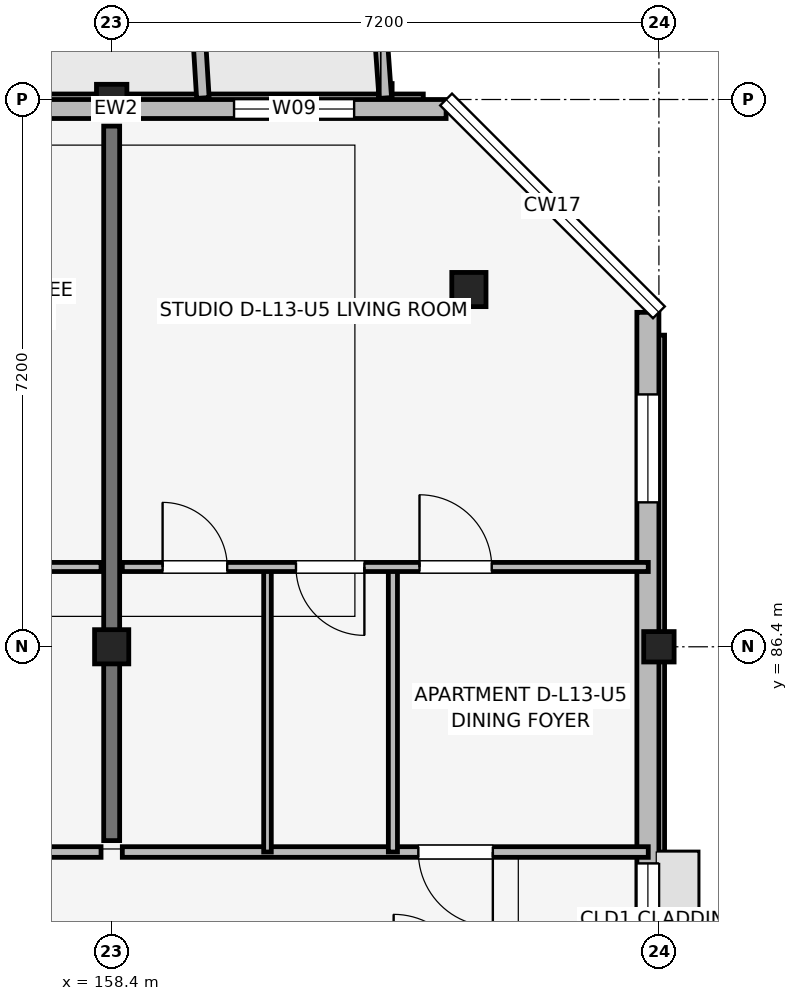
"""IFC4 building model, lengths in metres.
Left out: names, types, materials, properties, quantities, classifications, styles, units other than length and angle.
Written with IfcOpenShell. Run it as: python <this file> out.ifc"""

import sys

from ifc_helpers import new_model, si_unit, direction, frame, frame_2d, origin, origin_2d, place, context, subcontext, project, spatial, rectangle, extrude, element, fill, save


model = new_model("IFC4")
c1 = context("Model", 3, precision=1e-05, world=origin(), true_north=direction((0.0, 1.0)))
c2 = subcontext(c1, "Body", "Model", "MODEL_VIEW")
j1 = project(units=[si_unit("LENGTHUNIT", "METRE"), si_unit("PLANEANGLEUNIT", "RADIAN")], contexts=[c1])
p1 = place(None, origin())
s1 = spatial("IfcSite", under=j1, at=p1, CompositionType="ELEMENT")
p2 = place(p1, origin())
s2 = spatial("IfcBuilding", under=s1, at=p2, CompositionType="ELEMENT")
p3 = place(p2, frame((0.0, 0.0, 43.35)))
s3 = spatial("IfcBuildingStorey", under=s2, at=p3, CompositionType="ELEMENT", Elevation=43.35)
p4 = place(p3, frame((158.4, 86.4, 0.0), z_axis=(0.0, 0.0, 1.0), x_axis=(1.0, 0.0, 0.0)))
e1 = element("IfcColumn", 1, at=p4, inside=s3, PredefinedType="COLUMN", context=c2, shape_type="SweptSolid", body=[
    extrude(rectangle(XDim=0.45, YDim=0.45, at=origin_2d()), origin(), (0.0, 0.0, 1.0), 3.15),
])
for number, where, z_axis, x_axis in (
    (2, (158.4, 93.6, 0.0), (0.0, 0.0, 1.0), (1.0, 0.0, 0.0)),
    (3, (165.6, 86.4, 0.0), (0.0, 0.0, 1.0), (1.0, 0.0, 0.0)),
):
    element("IfcColumn", number, at=place(p3, frame(where, z_axis=z_axis, x_axis=x_axis)), inside=s3, PredefinedType="COLUMN", context=c2, shape_type="SweptSolid", body=[
        extrude(rectangle(XDim=0.4, YDim=0.4, at=origin_2d()), origin(), (0.0, 0.0, 1.0), 3.15),
    ])
p5 = place(p3, frame((163.1, 91.1, 0.0), z_axis=(0.0, 0.0, 1.0), x_axis=(1.0, 0.0, 0.0)))
e4 = element("IfcColumn", 4, at=p5, inside=s3, PredefinedType="COLUMN", context=c2, shape_type="SweptSolid", body=[
    extrude(rectangle(XDim=0.45, YDim=0.45, at=origin_2d()), origin(), (0.0, 0.0, 1.0), 3.15),
])
p6 = place(p3, frame((158.4, 83.85, 0.0), z_axis=(0.0, 0.0, 1.0), x_axis=(0.0, 1.0, 0.0)))
e5 = element("IfcWall", 5, at=p6, inside=s3, PredefinedType="SHEAR", context=c2, shape_type="SweptSolid", body=[
    extrude(rectangle(XDim=9.4, YDim=0.21, at=frame_2d((4.7, 0.0))), origin(), (0.0, 0.0, 1.0), 3.15),
])
p7 = place(p3, frame((165.455, 74.8, 0.0), z_axis=(0.0, 0.0, 1.0), x_axis=(0.0, 1.0, 0.0)))
e6 = element("IfcWall", 6, at=p7, inside=s3, PredefinedType="SOLIDWALL", context=c2, shape_type="SweptSolid", body=[
    extrude(rectangle(XDim=16.0, YDim=0.29, at=frame_2d((8.0, 0.0))), origin(), (0.0, 0.0, 1.0), 2.51),
])
p8 = place(p7, frame((7.25, 0.0, 1.05)))
e7 = element("IfcOpeningElement", 7, at=p8, cuts=e6, PredefinedType="OPENING", context=c2, shape_type="SweptSolid", body=[
    extrude(rectangle(XDim=1.5, YDim=1.15, at=frame_2d((0.75, 0.575))), frame((0.0, 0.155, 0.0), z_axis=(0.0, -1.0, 0.0), x_axis=(1.0, 0.0, 0.0)), (0.0, 0.0, 1.0), 0.31),
])
p9 = place(p7, frame((13.5, 0.0, 0.75)))
e8 = element("IfcOpeningElement", 8, at=p9, cuts=e6, PredefinedType="OPENING", context=c2, shape_type="SweptSolid", body=[
    extrude(rectangle(XDim=1.42, YDim=1.6, at=frame_2d((0.71, 0.8))), frame((0.0, 0.155, 0.0), z_axis=(0.0, -1.0, 0.0), x_axis=(1.0, 0.0, 0.0)), (0.0, 0.0, 1.0), 0.31),
])
p10 = place(p3, frame((162.8, 93.475, 0.0), z_axis=(0.0, 0.0, 1.0), x_axis=(-1.0, 0.0, 0.0)))
e9 = element("IfcWall", 9, at=p10, inside=s3, PredefinedType="SOLIDWALL", context=c2, shape_type="SweptSolid", body=[
    extrude(rectangle(XDim=30.4, YDim=0.25, at=frame_2d((15.2, 0.0))), origin(), (0.0, 0.0, 1.0), 2.45),
])
p11 = place(p10, frame((21.95, 0.0, 0.0), z_axis=(0.0, 0.0, 1.0), x_axis=(-1.0, 0.0, 0.0)))
e10 = element("IfcOpeningElement", 10, at=p11, cuts=e9, PredefinedType="OPENING", context=c2, shape_type="SweptSolid", body=[
    extrude(rectangle(XDim=1.5, YDim=2.15, at=frame_2d((0.75, 1.075))), frame((0.0, 0.135, 0.0), z_axis=(0.0, -1.0, 0.0), x_axis=(1.0, 0.0, 0.0)), (0.0, 0.0, 1.0), 0.27),
])
p12 = place(p10, frame((7.7, 0.0, 0.0), z_axis=(0.0, 0.0, 1.0), x_axis=(-1.0, 0.0, 0.0)))
e11 = element("IfcOpeningElement", 11, at=p12, cuts=e9, PredefinedType="OPENING", context=c2, shape_type="SweptSolid", body=[
    extrude(rectangle(XDim=1.8, YDim=2.15, at=frame_2d((0.9, 1.075))), frame((0.0, 0.135, 0.0), z_axis=(0.0, -1.0, 0.0), x_axis=(1.0, 0.0, 0.0)), (0.0, 0.0, 1.0), 0.27),
])
p13 = place(p10, frame((27.97, 0.0, 0.7)))
e12 = element("IfcOpeningElement", 12, at=p13, cuts=e9, PredefinedType="OPENING", context=c2, shape_type="SweptSolid", body=[
    extrude(rectangle(XDim=1.46, YDim=1.55, at=frame_2d((0.73, 0.775))), frame((0.0, 0.135, 0.0), z_axis=(0.0, -1.0, 0.0), x_axis=(1.0, 0.0, 0.0)), (0.0, 0.0, 1.0), 0.27),
])
p14 = place(p10, frame((26.42, 0.0, 0.75)))
e13 = element("IfcOpeningElement", 13, at=p14, cuts=e9, PredefinedType="OPENING", context=c2, shape_type="SweptSolid", body=[
    extrude(rectangle(XDim=0.6, YDim=1.25, at=frame_2d((0.3, 0.625))), frame((0.0, 0.135, 0.0), z_axis=(0.0, -1.0, 0.0), x_axis=(1.0, 0.0, 0.0)), (0.0, 0.0, 1.0), 0.27),
])
p15 = place(p10, frame((24.98, 0.0, 0.75)))
e14 = element("IfcOpeningElement", 14, at=p15, cuts=e9, PredefinedType="OPENING", context=c2, shape_type="SweptSolid", body=[
    extrude(rectangle(XDim=0.6, YDim=1.25, at=frame_2d((0.3, 0.625))), frame((0.0, 0.135, 0.0), z_axis=(0.0, -1.0, 0.0), x_axis=(1.0, 0.0, 0.0)), (0.0, 0.0, 1.0), 0.27),
])
p16 = place(p10, frame((16.725, 0.0, 0.75)))
e15 = element("IfcOpeningElement", 15, at=p16, cuts=e9, PredefinedType="OPENING", context=c2, shape_type="SweptSolid", body=[
    extrude(rectangle(XDim=0.72, YDim=1.35, at=frame_2d((0.36, 0.675))), frame((0.0, 0.135, 0.0), z_axis=(0.0, -1.0, 0.0), x_axis=(1.0, 0.0, 0.0)), (0.0, 0.0, 1.0), 0.27),
])
p17 = place(p10, frame((12.925, 0.0, 0.69)))
e16 = element("IfcOpeningElement", 16, at=p17, cuts=e9, PredefinedType="OPENING", context=c2, shape_type="SweptSolid", body=[
    extrude(rectangle(XDim=2.15, YDim=1.65, at=frame_2d((1.075, 0.825))), frame((0.0, 0.135, 0.0), z_axis=(0.0, -1.0, 0.0), x_axis=(1.0, 0.0, 0.0)), (0.0, 0.0, 1.0), 0.27),
])
p18 = place(p10, frame((9.525, 0.0, 0.75)))
e17 = element("IfcOpeningElement", 17, at=p18, cuts=e9, PredefinedType="OPENING", context=c2, shape_type="SweptSolid", body=[
    extrude(rectangle(XDim=0.72, YDim=1.35, at=frame_2d((0.36, 0.675))), frame((0.0, 0.135, 0.0), z_axis=(0.0, -1.0, 0.0), x_axis=(1.0, 0.0, 0.0)), (0.0, 0.0, 1.0), 0.27),
])
p19 = place(p10, frame((1.21, 0.0, 0.7)))
e18 = element("IfcOpeningElement", 18, at=p19, cuts=e9, PredefinedType="OPENING", context=c2, shape_type="SweptSolid", body=[
    extrude(rectangle(XDim=1.58, YDim=1.6, at=frame_2d((0.79, 0.8))), frame((0.0, 0.135, 0.0), z_axis=(0.0, -1.0, 0.0), x_axis=(1.0, 0.0, 0.0)), (0.0, 0.0, 1.0), 0.27),
])
p20 = place(p3, frame((159.6, 93.62, 0.0), z_axis=(0.0, 0.0, 1.0), x_axis=(-0.061170732449, 0.998127317276, 0.0)))
e19 = element("IfcWall", 19, at=p20, inside=s3, PredefinedType="ELEMENTEDWALL", context=c2, shape_type="SweptSolid", body=[
    extrude(rectangle(XDim=1.964, YDim=0.165, at=frame_2d((0.982, 0.0))), origin(), (0.0, 0.0, 1.0), 2.8),
])
p21 = place(p3, frame((162.0, 93.62, 0.0), z_axis=(0.0, 0.0, 1.0), x_axis=(-0.071194071069, 0.997462482625, 0.0)))
e20 = element("IfcWall", 20, at=p21, inside=s3, PredefinedType="ELEMENTEDWALL", context=c2, shape_type="SweptSolid", body=[
    extrude(rectangle(XDim=1.965, YDim=0.165, at=frame_2d((0.982, 0.0))), origin(), (0.0, 0.0, 1.0), 2.8),
])
p22 = place(p3, frame((151.34, 83.7, 0.0), z_axis=(0.0, 0.0, 1.0), x_axis=(1.0, 0.0, 0.0)))
e21 = element("IfcWall", 21, at=p22, inside=s3, PredefinedType="PARTITIONING", context=c2, shape_type="SweptSolid", body=[
    extrude(rectangle(XDim=6.92, YDim=0.14, at=frame_2d((3.46, 0.0))), origin(), (0.0, 0.0, 1.0), 2.38),
])
p23 = place(p22, frame((5.145, 0.0, 0.0)))
e22 = element("IfcOpeningElement", 22, at=p23, cuts=e21, PredefinedType="OPENING", context=c2, shape_type="SweptSolid", body=[
    extrude(rectangle(XDim=0.98, YDim=2.1, at=frame_2d((0.49, 1.05))), frame((0.0, 0.08, 0.0), z_axis=(0.0, -1.0, 0.0), x_axis=(1.0, 0.0, 0.0)), (0.0, 0.0, 1.0), 0.16),
])
p24 = place(p3, frame((151.34, 87.45, 0.0), z_axis=(0.0, 0.0, 1.0), x_axis=(1.0, 0.0, 0.0)))
e23 = element("IfcWall", 23, at=p24, inside=s3, PredefinedType="PARTITIONING", context=c2, shape_type="SweptSolid", body=[
    extrude(rectangle(XDim=6.92, YDim=0.12, at=frame_2d((3.46, 0.0))), origin(), (0.0, 0.0, 1.0), 2.38),
])
p25 = place(p24, frame((1.475, 0.0, 0.0), z_axis=(0.0, 0.0, 1.0), x_axis=(-1.0, 0.0, 0.0)))
e24 = element("IfcOpeningElement", 24, at=p25, cuts=e23, PredefinedType="OPENING", context=c2, shape_type="SweptSolid", body=[
    extrude(rectangle(XDim=0.85, YDim=2.08, at=frame_2d((0.425, 1.04))), frame((0.0, 0.07, 0.0), z_axis=(0.0, -1.0, 0.0), x_axis=(1.0, 0.0, 0.0)), (0.0, 0.0, 1.0), 0.14),
])
p26 = place(p24, frame((2.775, 0.0, 0.0)))
e25 = element("IfcOpeningElement", 25, at=p26, cuts=e23, PredefinedType="OPENING", context=c2, shape_type="SweptSolid", body=[
    extrude(rectangle(XDim=0.9, YDim=2.08, at=frame_2d((0.45, 1.04))), frame((0.0, 0.07, 0.0), z_axis=(0.0, -1.0, 0.0), x_axis=(1.0, 0.0, 0.0)), (0.0, 0.0, 1.0), 0.14),
])
p27 = place(p24, frame((6.11, 0.0, 0.0), z_axis=(0.0, 0.0, 1.0), x_axis=(-1.0, 0.0, 0.0)))
e26 = element("IfcOpeningElement", 26, at=p27, cuts=e23, PredefinedType="OPENING", context=c2, shape_type="SweptSolid", body=[
    extrude(rectangle(XDim=0.95, YDim=2.08, at=frame_2d((0.475, 1.04))), frame((0.0, 0.07, 0.0), z_axis=(0.0, -1.0, 0.0), x_axis=(1.0, 0.0, 0.0)), (0.0, 0.0, 1.0), 0.14),
])
p28 = place(p3, frame((158.54, 83.7, 0.0), z_axis=(0.0, 0.0, 1.0), x_axis=(1.0, 0.0, 0.0)))
e27 = element("IfcWall", 27, at=p28, inside=s3, PredefinedType="PARTITIONING", context=c2, shape_type="SweptSolid", body=[
    extrude(rectangle(XDim=6.92, YDim=0.14, at=frame_2d((3.46, 0.0))), origin(), (0.0, 0.0, 1.0), 2.38),
])
p29 = place(p28, frame((4.875, 0.0, 0.0), z_axis=(0.0, 0.0, 1.0), x_axis=(-1.0, 0.0, 0.0)))
e28 = element("IfcOpeningElement", 28, at=p29, cuts=e27, PredefinedType="OPENING", context=c2, shape_type="SweptSolid", body=[
    extrude(rectangle(XDim=0.98, YDim=2.1, at=frame_2d((0.49, 1.05))), frame((0.0, 0.08, 0.0), z_axis=(0.0, -1.0, 0.0), x_axis=(1.0, 0.0, 0.0)), (0.0, 0.0, 1.0), 0.16),
])
p30 = place(p3, frame((160.45, 83.7, 0.0), z_axis=(0.0, 0.0, 1.0), x_axis=(0.0, 1.0, 0.0)))
e29 = element("IfcWall", 29, at=p30, inside=s3, PredefinedType="PARTITIONING", context=c2, shape_type="SweptSolid", body=[
    extrude(rectangle(XDim=3.75, YDim=0.1, at=frame_2d((1.875, 0.0))), origin(), (0.0, 0.0, 1.0), 2.38),
])
p31 = place(p3, frame((162.1, 83.7, 0.0), z_axis=(0.0, 0.0, 1.0), x_axis=(0.0, 1.0, 0.0)))
e30 = element("IfcWall", 30, at=p31, inside=s3, PredefinedType="PARTITIONING", context=c2, shape_type="SweptSolid", body=[
    extrude(rectangle(XDim=3.75, YDim=0.12, at=frame_2d((1.875, 0.0))), origin(), (0.0, 0.0, 1.0), 2.38),
])
p32 = place(p3, frame((158.54, 87.45, 0.0), z_axis=(0.0, 0.0, 1.0), x_axis=(1.0, 0.0, 0.0)))
e31 = element("IfcWall", 31, at=p32, inside=s3, PredefinedType="PARTITIONING", context=c2, shape_type="SweptSolid", body=[
    extrude(rectangle(XDim=6.92, YDim=0.12, at=frame_2d((3.46, 0.0))), origin(), (0.0, 0.0, 1.0), 2.38),
])
p33 = place(p32, frame((0.53, 0.0, 0.0)))
e32 = element("IfcOpeningElement", 32, at=p33, cuts=e31, PredefinedType="OPENING", context=c2, shape_type="SweptSolid", body=[
    extrude(rectangle(XDim=0.85, YDim=2.08, at=frame_2d((0.425, 1.04))), frame((0.0, 0.07, 0.0), z_axis=(0.0, -1.0, 0.0), x_axis=(1.0, 0.0, 0.0)), (0.0, 0.0, 1.0), 0.14),
])
p34 = place(p32, frame((3.185, 0.0, 0.0), z_axis=(0.0, 0.0, 1.0), x_axis=(-1.0, 0.0, 0.0)))
e33 = element("IfcOpeningElement", 33, at=p34, cuts=e31, PredefinedType="OPENING", context=c2, shape_type="SweptSolid", body=[
    extrude(rectangle(XDim=0.9, YDim=2.08, at=frame_2d((0.45, 1.04))), frame((0.0, 0.07, 0.0), z_axis=(0.0, -1.0, 0.0), x_axis=(1.0, 0.0, 0.0)), (0.0, 0.0, 1.0), 0.14),
])
p35 = place(p32, frame((3.91, 0.0, 0.0)))
e34 = element("IfcOpeningElement", 34, at=p35, cuts=e31, PredefinedType="OPENING", context=c2, shape_type="SweptSolid", body=[
    extrude(rectangle(XDim=0.95, YDim=2.08, at=frame_2d((0.475, 1.04))), frame((0.0, 0.07, 0.0), z_axis=(0.0, -1.0, 0.0), x_axis=(1.0, 0.0, 0.0)), (0.0, 0.0, 1.0), 0.14),
])
p36 = place(p19, origin())
e35 = element("IfcWindow", 35, at=p36, inside=s3, PartitioningType="SINGLE_PANEL", PredefinedType="WINDOW", context=c2, shape_type="SweptSolid", body=[
    extrude(rectangle(XDim=1.58, YDim=1.6, at=frame_2d((0.79, 0.8))), frame((0.0, 0.03, 0.0), z_axis=(0.0, -1.0, 0.0), x_axis=(1.0, 0.0, 0.0)), (0.0, 0.0, 1.0), 0.06),
])
fill(e18, e35)
p37 = place(p8, origin())
e36 = element("IfcWindow", 36, at=p37, inside=s3, PartitioningType="SINGLE_PANEL", PredefinedType="WINDOW", context=c2, shape_type="SweptSolid", body=[
    extrude(rectangle(XDim=1.5, YDim=1.15, at=frame_2d((0.75, 0.575))), frame((0.0, 0.03, 0.0), z_axis=(0.0, -1.0, 0.0), x_axis=(1.0, 0.0, 0.0)), (0.0, 0.0, 1.0), 0.06),
])
fill(e7, e36)
p38 = place(p9, origin())
e37 = element("IfcWindow", 37, at=p38, inside=s3, PartitioningType="SINGLE_PANEL", PredefinedType="WINDOW", context=c2, shape_type="SweptSolid", body=[
    extrude(rectangle(XDim=1.42, YDim=1.6, at=frame_2d((0.71, 0.8))), frame((0.0, 0.03, 0.0), z_axis=(0.0, -1.0, 0.0), x_axis=(1.0, 0.0, 0.0)), (0.0, 0.0, 1.0), 0.06),
])
fill(e8, e37)
p39 = place(p29, origin())
e38 = element("IfcDoor", 38, at=p39, inside=s3, OperationType="SINGLE_SWING_RIGHT", PredefinedType="DOOR", context=c2, shape_type="SweptSolid", body=[
    extrude(rectangle(XDim=0.98, YDim=2.1, at=frame_2d((0.49, 1.05))), frame((0.0, 0.025, 0.0), z_axis=(0.0, -1.0, 0.0), x_axis=(1.0, 0.0, 0.0)), (0.0, 0.0, 1.0), 0.05),
])
fill(e28, e38)
p40 = place(p33, origin())
e39 = element("IfcDoor", 39, at=p40, inside=s3, OperationType="SINGLE_SWING_LEFT", PredefinedType="DOOR", context=c2, shape_type="SweptSolid", body=[
    extrude(rectangle(XDim=0.85, YDim=2.08, at=frame_2d((0.425, 1.04))), frame((0.0, 0.025, 0.0), z_axis=(0.0, -1.0, 0.0), x_axis=(1.0, 0.0, 0.0)), (0.0, 0.0, 1.0), 0.05),
])
fill(e32, e39)
p41 = place(p34, origin())
e40 = element("IfcDoor", 40, at=p41, inside=s3, OperationType="SINGLE_SWING_RIGHT", PredefinedType="DOOR", context=c2, shape_type="SweptSolid", body=[
    extrude(rectangle(XDim=0.9, YDim=2.08, at=frame_2d((0.45, 1.04))), frame((0.0, 0.025, 0.0), z_axis=(0.0, -1.0, 0.0), x_axis=(1.0, 0.0, 0.0)), (0.0, 0.0, 1.0), 0.05),
])
fill(e33, e40)
p42 = place(p35, origin())
e41 = element("IfcDoor", 41, at=p42, inside=s3, OperationType="SINGLE_SWING_LEFT", PredefinedType="DOOR", context=c2, shape_type="SweptSolid", body=[
    extrude(rectangle(XDim=0.95, YDim=2.08, at=frame_2d((0.475, 1.04))), frame((0.0, 0.025, 0.0), z_axis=(0.0, -1.0, 0.0), x_axis=(1.0, 0.0, 0.0)), (0.0, 0.0, 1.0), 0.05),
])
fill(e34, e41)
save(model, sys.argv[1])
